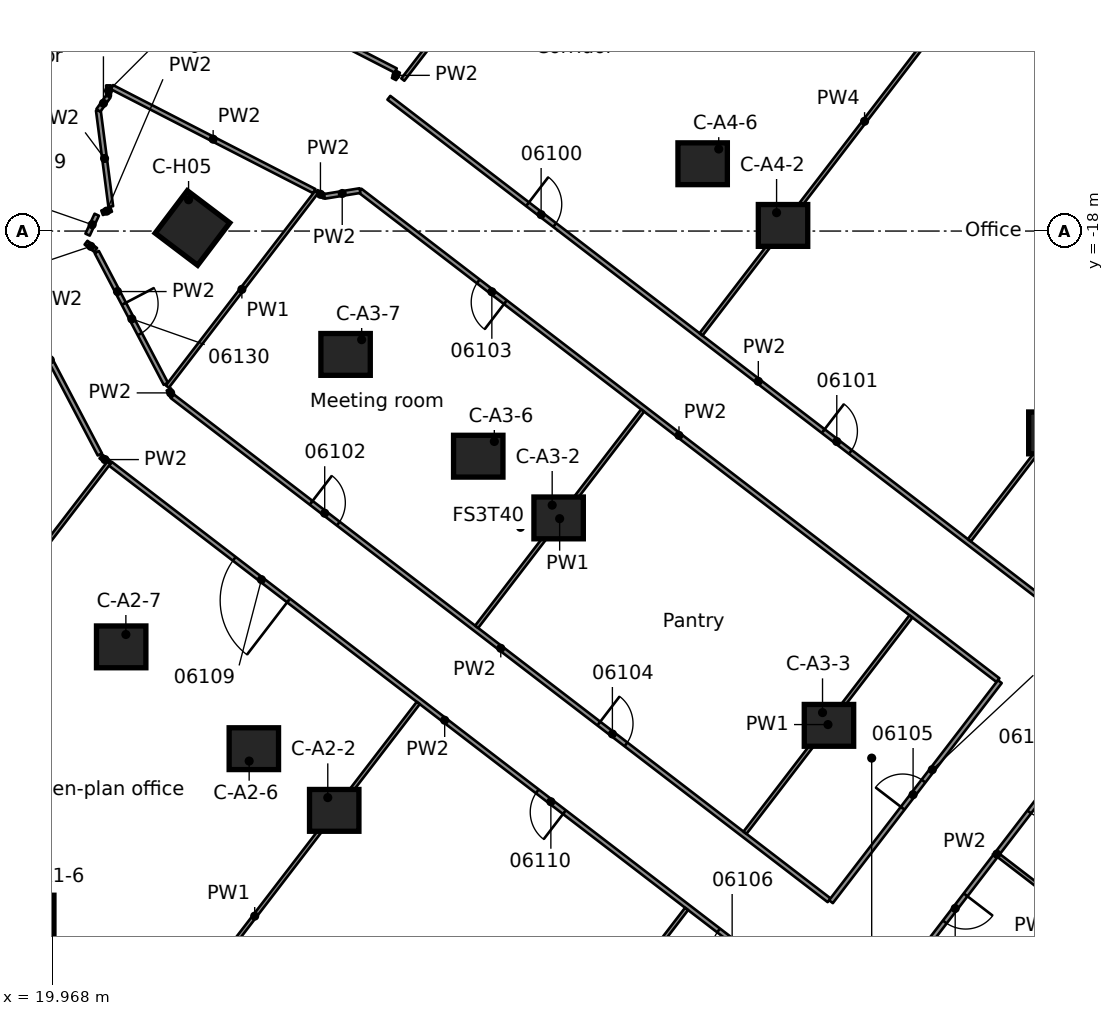
"""IFC4 building model, lengths in metres.
Left out: names, types, materials, properties, quantities, classifications, styles, units other than length and angle.
Written with IfcOpenShell. Run it as: python <this file> out.ifc"""

import sys

from ifc_helpers import new_model, si_unit, direction, frame, frame_2d, origin, origin_2d, place, context, subcontext, project, spatial, rectangle, extrude, element, fill, save


model = new_model("IFC4")
c1 = context("Model", 3, precision=1e-05, world=origin(), true_north=direction((0.0, 1.0)))
c2 = subcontext(c1, "Body", "Model", "MODEL_VIEW")
j1 = project(units=[si_unit("LENGTHUNIT", "METRE"), si_unit("PLANEANGLEUNIT", "RADIAN")], contexts=[c1])
p1 = place(None, origin())
s1 = spatial("IfcSite", under=j1, at=p1, CompositionType="ELEMENT")
p2 = place(p1, origin())
s2 = spatial("IfcBuilding", under=s1, at=p2, CompositionType="ELEMENT")
p3 = place(p2, frame((0.0, 0.0, 29.2)))
s3 = spatial("IfcBuildingStorey", under=s2, at=p3, CompositionType="ELEMENT", Elevation=29.2)
for number, where, z_axis, x_axis in (
    (1, (19.364, -36.026, 0.0), (0.0, 0.0, 1.0), (1.0, 0.0, 0.0)),
    (2, (27.389, -33.243, 0.0), (0.0, 0.0, 1.0), (1.0, 0.0, 0.0)),
    (3, (25.274, -31.62, 0.0), (0.0, 0.0, 1.0), (1.0, 0.0, 0.0)),
    (4, (21.783, -28.941, 0.0), (0.0, 0.0, 1.0), (1.0, 0.0, 0.0)),
    (5, (33.294, -25.548, 0.0), (0.0, 0.0, 1.0), (1.0, 0.0, 0.0)),
    (6, (40.408, -31.006, 0.0), (0.0, 0.0, 1.0), (1.0, 0.0, 0.0)),
    (7, (31.179, -23.924, 0.0), (0.0, 0.0, 1.0), (1.0, 0.0, 0.0)),
    (8, (27.688, -21.246, 0.0), (0.0, 0.0, 1.0), (1.0, 0.0, 0.0)),
    (9, (39.199, -17.852, 0.0), (0.0, 0.0, 1.0), (1.0, 0.0, 0.0)),
    (10, (46.313, -23.311, 0.0), (0.0, 0.0, 1.0), (1.0, 0.0, 0.0)),
    (11, (37.084, -16.229, 0.0), (0.0, 0.0, 1.0), (1.0, 0.0, 0.0)),
):
    element("IfcColumn", number, at=place(p3, frame(where, z_axis=z_axis, x_axis=x_axis)), inside=s3, PredefinedType="COLUMN", context=c2, shape_type="SweptSolid", body=[
        extrude(rectangle(XDim=1.3, YDim=1.1, at=origin_2d()), origin(), (0.0, 0.0, 1.0), 4.1),
    ])
p4 = place(p3, frame((23.659, -17.919, 0.0), z_axis=(0.0, 0.0, 1.0), x_axis=(0.797162615875, -0.603764659327, 0.0)))
e12 = element("IfcColumn", 12, at=p4, inside=s3, PredefinedType="COLUMN", context=c2, shape_type="SweptSolid", body=[
    extrude(rectangle(XDim=1.4, YDim=1.4, at=origin_2d()), origin(), (0.0, 0.0, 1.0), 4.1),
])
p5 = place(p3, frame((21.182, -14.826, 0.0), z_axis=(0.0, 0.0, 1.0), x_axis=(0.128335992274, -0.991730746265, 0.0)))
e13 = element("IfcWall", 13, at=p5, inside=s3, PredefinedType="PARTITIONING", context=c2, shape_type="SweptSolid", body=[
    extrude(rectangle(XDim=2.549, YDim=0.125, at=frame_2d((1.274, 0.0))), origin(), (0.0, 0.0, 1.0), 3.66),
])
p6 = place(p3, frame((23.036, -22.167, 0.0), z_axis=(0.0, 0.0, 1.0), x_axis=(0.465065214543, -0.885276423623, 0.0)))
e14 = element("IfcWall", 14, at=p6, inside=s3, PredefinedType="PARTITIONING", context=c2, shape_type="SweptSolid", body=[
    extrude(rectangle(XDim=0.207, YDim=0.125, at=frame_2d((0.104, 0.0))), origin(), (0.0, 0.0, 1.0), 3.66),
])
p7 = place(p3, frame((18.615, -18.909, 0.0), z_axis=(0.0, 0.0, 1.0), x_axis=(0.464655649815, -0.885491460769, 0.0)))
e15 = element("IfcWall", 15, at=p7, inside=s3, PredefinedType="PARTITIONING", context=c2, shape_type="SweptSolid", body=[
    extrude(rectangle(XDim=5.61, YDim=0.125, at=frame_2d((2.805, 0.0))), origin(), (0.0, 0.0, 1.0), 3.66),
])
p8 = place(p3, frame((21.14, -18.552, 0.0), z_axis=(0.0, 0.0, 1.0), x_axis=(0.464519693812, -0.885562789451, 0.0)))
e16 = element("IfcWall", 16, at=p8, inside=s3, PredefinedType="PARTITIONING", context=c2, shape_type="SweptSolid", body=[
    extrude(rectangle(XDim=3.914, YDim=0.125, at=frame_2d((1.957, 0.0))), origin(), (0.0, 0.0, 1.0), 3.66),
])
p9 = place(p8, frame((1.538, 0.0, 0.0)))
e17 = element("IfcOpeningElement", 17, at=p9, cuts=e16, PredefinedType="OPENING", context=c2, shape_type="SweptSolid", body=[
    extrude(rectangle(XDim=0.9, YDim=2.1, at=frame_2d((0.45, 1.05))), frame((0.0, 0.073, 0.0), z_axis=(0.0, -1.0, 0.0), x_axis=(1.0, 0.0, 0.0)), (0.0, 0.0, 1.0), 0.145),
])
p10 = place(p3, frame((39.09, -37.62, 0.0), z_axis=(0.0, 0.0, 1.0), x_axis=(-0.793364364442, 0.608747061786, 0.0)))
e18 = element("IfcWall", 18, at=p10, inside=s3, PredefinedType="PARTITIONING", context=c2, shape_type="SweptSolid", body=[
    extrude(rectangle(XDim=22.17, YDim=0.125, at=frame_2d((11.085, 0.0))), origin(), (0.0, 0.0, 1.0), 3.66),
])
p11 = place(p10, frame((1.1, 0.0, 0.0)))
e19 = element("IfcOpeningElement", 19, at=p11, cuts=e18, PredefinedType="OPENING", context=c2, shape_type="SweptSolid", body=[
    extrude(rectangle(XDim=0.9, YDim=2.1, at=frame_2d((0.45, 1.05))), frame((0.0, 0.073, 0.0), z_axis=(0.0, -1.0, 0.0), x_axis=(1.0, 0.0, 0.0)), (0.0, 0.0, 1.0), 0.145),
])
p12 = place(p10, frame((16.263, 0.0, 0.0)))
e20 = element("IfcOpeningElement", 20, at=p12, cuts=e18, PredefinedType="OPENING", context=c2, shape_type="SweptSolid", body=[
    extrude(rectangle(XDim=1.8, YDim=2.1, at=frame_2d((0.9, 1.05))), frame((0.0, 0.073, 0.0), z_axis=(0.0, -1.0, 0.0), x_axis=(1.0, 0.0, 0.0)), (0.0, 0.0, 1.0), 0.145),
])
p13 = place(p10, frame((7.113, 0.0, 0.0)))
e21 = element("IfcOpeningElement", 21, at=p13, cuts=e18, PredefinedType="OPENING", context=c2, shape_type="SweptSolid", body=[
    extrude(rectangle(XDim=0.9, YDim=2.1, at=frame_2d((0.45, 1.05))), frame((0.0, 0.073, 0.0), z_axis=(0.0, -1.0, 0.0), x_axis=(1.0, 0.0, 0.0)), (0.0, 0.0, 1.0), 0.145),
])
p14 = place(p3, frame((23.132, -22.35, 0.0), z_axis=(0.0, 0.0, 1.0), x_axis=(0.79336850047, -0.60874167137, 0.0)))
e22 = element("IfcWall", 22, at=p14, inside=s3, PredefinedType="PARTITIONING", context=c2, shape_type="SweptSolid", body=[
    extrude(rectangle(XDim=21.779, YDim=0.125, at=frame_2d((10.89, 0.0))), origin(), (0.0, 0.0, 1.0), 3.66),
])
p15 = place(p14, frame((4.6, 0.0, 0.0)))
e23 = element("IfcOpeningElement", 23, at=p15, cuts=e22, PredefinedType="OPENING", context=c2, shape_type="SweptSolid", body=[
    extrude(rectangle(XDim=0.9, YDim=2.1, at=frame_2d((0.45, 1.05))), frame((0.0, 0.073, 0.0), z_axis=(0.0, -1.0, 0.0), x_axis=(1.0, 0.0, 0.0)), (0.0, 0.0, 1.0), 0.145),
])
p16 = place(p14, frame((14.142, 0.0, 0.0)))
e24 = element("IfcOpeningElement", 24, at=p16, cuts=e22, PredefinedType="OPENING", context=c2, shape_type="SweptSolid", body=[
    extrude(rectangle(XDim=0.9, YDim=2.1, at=frame_2d((0.45, 1.05))), frame((0.0, 0.073, 0.0), z_axis=(0.0, -1.0, 0.0), x_axis=(1.0, 0.0, 0.0)), (0.0, 0.0, 1.0), 0.145),
])
p17 = place(p3, frame((44.875, -34.433, 0.0), z_axis=(0.0, 0.0, 1.0), x_axis=(0.793295570217, -0.60883670904, 0.0)))
e25 = element("IfcWall", 25, at=p17, inside=s3, PredefinedType="PARTITIONING", context=c2, shape_type="SweptSolid", body=[
    extrude(rectangle(XDim=4.186, YDim=0.1, at=frame_2d((2.093, 0.0))), origin(), (0.0, 0.0, 1.0), 3.66),
])
p18 = place(p3, frame((44.855, -29.817, 0.0), z_axis=(0.0, 0.0, 1.0), x_axis=(-0.793378264443, 0.608728945844, 0.0)))
e26 = element("IfcWall", 26, at=p18, inside=s3, PredefinedType="PARTITIONING", context=c2, shape_type="SweptSolid", body=[
    extrude(rectangle(XDim=21.16, YDim=0.125, at=frame_2d((10.58, 0.0))), origin(), (0.0, 0.0, 1.0), 3.66),
])
p19 = place(p18, frame((16.337, 0.0, 0.0)))
e27 = element("IfcOpeningElement", 27, at=p19, cuts=e26, PredefinedType="OPENING", context=c2, shape_type="SweptSolid", body=[
    extrude(rectangle(XDim=0.9, YDim=2.1, at=frame_2d((0.45, 1.05))), frame((0.0, 0.073, 0.0), z_axis=(0.0, -1.0, 0.0), x_axis=(1.0, 0.0, 0.0)), (0.0, 0.0, 1.0), 0.145),
])
p20 = place(p3, frame((28.827, -14.493, 0.0), z_axis=(0.0, 0.0, 1.0), x_axis=(0.793315591759, -0.608810620695, 0.0)))
e28 = element("IfcWall", 28, at=p20, inside=s3, PredefinedType="PARTITIONING", context=c2, shape_type="SweptSolid", body=[
    extrude(rectangle(XDim=24.509, YDim=0.125, at=frame_2d((12.254, 0.0))), origin(), (0.0, 0.0, 1.0), 3.66),
])
p21 = place(p20, frame((4.6, 0.0, 0.0)))
e29 = element("IfcOpeningElement", 29, at=p21, cuts=e28, PredefinedType="OPENING", context=c2, shape_type="SweptSolid", body=[
    extrude(rectangle(XDim=0.9, YDim=2.1, at=frame_2d((0.45, 1.05))), frame((0.0, 0.073, 0.0), z_axis=(0.0, -1.0, 0.0), x_axis=(1.0, 0.0, 0.0)), (0.0, 0.0, 1.0), 0.145),
])
p22 = place(p20, frame((14.407, 0.0, 0.0)))
e30 = element("IfcOpeningElement", 30, at=p22, cuts=e28, PredefinedType="OPENING", context=c2, shape_type="SweptSolid", body=[
    extrude(rectangle(XDim=0.9, YDim=2.1, at=frame_2d((0.45, 1.05))), frame((0.0, 0.073, 0.0), z_axis=(0.0, -1.0, 0.0), x_axis=(1.0, 0.0, 0.0)), (0.0, 0.0, 1.0), 0.145),
])
p23 = place(p3, frame((21.251, -23.933, 0.0), z_axis=(0.0, 0.0, 1.0), x_axis=(0.795537882178, -0.605903852124, 0.0)))
e31 = element("IfcWall", 31, at=p23, inside=s3, PredefinedType="PARTITIONING", context=c2, shape_type="SweptSolid", body=[
    extrude(rectangle(XDim=0.264, YDim=0.125, at=frame_2d((0.132, 0.0))), origin(), (0.0, 0.0, 1.0), 3.66),
])
p24 = place(p3, frame((20.858, -18.306, 0.0), z_axis=(0.0, 0.0, 1.0), x_axis=(0.798056474533, -0.602582661098, 0.0)))
e32 = element("IfcWall", 32, at=p24, inside=s3, PredefinedType="PARTITIONING", context=c2, shape_type="SweptSolid", body=[
    extrude(rectangle(XDim=0.317, YDim=0.125, at=frame_2d((0.159, 0.0))), origin(), (0.0, 0.0, 1.0), 3.66),
])
p25 = place(p3, frame((26.921, -16.978, 0.0), z_axis=(0.0, 0.0, 1.0), x_axis=(0.888809707019, -0.458276450093, 0.0)))
e33 = element("IfcWall", 33, at=p25, inside=s3, PredefinedType="PARTITIONING", context=c2, shape_type="SweptSolid", body=[
    extrude(rectangle(XDim=0.238, YDim=0.125, at=frame_2d((0.119, 0.0))), origin(), (0.0, 0.0, 1.0), 3.66),
])
p26 = place(p3, frame((21.541, -14.214, 0.0), z_axis=(0.0, 0.0, 1.0), x_axis=(0.889437525622, -0.457056766732, 0.0)))
e34 = element("IfcWall", 34, at=p26, inside=s3, PredefinedType="PARTITIONING", context=c2, shape_type="SweptSolid", body=[
    extrude(rectangle(XDim=5.986, YDim=0.125, at=frame_2d((2.993, 0.0))), origin(), (0.0, 0.0, 1.0), 3.66),
])
p27 = place(p3, frame((21.541, -9.94, 0.0), z_axis=(0.0, 0.0, 1.0), x_axis=(0.889469569246, -0.456994404107, 0.0)))
e35 = element("IfcWall", 35, at=p27, inside=s3, PredefinedType="PARTITIONING", context=c2, shape_type="SweptSolid", body=[
    extrude(rectangle(XDim=8.394, YDim=0.125, at=frame_2d((4.197, 0.0))), origin(), (0.0, 0.0, 1.0), 3.66),
])
p28 = place(p3, frame((21.182, -14.826, 0.0), z_axis=(0.0, 0.0, 1.0), x_axis=(0.581538757464, 0.813518698966, 0.0)))
e36 = element("IfcWall", 36, at=p28, inside=s3, PredefinedType="PARTITIONING", context=c2, shape_type="SweptSolid", body=[
    extrude(rectangle(XDim=0.461, YDim=0.125, at=frame_2d((0.23, 0.0))), origin(), (0.0, 0.0, 1.0), 3.66),
])
p29 = place(p3, frame((21.281, -17.519, 0.0), z_axis=(0.0, 0.0, 1.0), x_axis=(0.939031864477, 0.343830128839, 0.0)))
e37 = element("IfcWall", 37, at=p29, inside=s3, PredefinedType="PARTITIONING", context=c2, shape_type="SweptSolid", body=[
    extrude(rectangle(XDim=0.253, YDim=0.125, at=frame_2d((0.127, 0.0))), origin(), (0.0, 0.0, 1.0), 3.66),
])
p30 = place(p3, frame((48.508, -29.595, 0.0), z_axis=(0.0, 0.0, 1.0), x_axis=(-0.608738166201, -0.793371189929, 0.0)))
e38 = element("IfcWall", 38, at=p30, inside=s3, PredefinedType="PARTITIONING", context=c2, shape_type="SweptSolid", body=[
    extrude(rectangle(XDim=12.1, YDim=0.125, at=frame_2d((6.05, 0.0))), origin(), (0.0, 0.0, 1.0), 3.66),
])
p31 = place(p30, frame((7.4, 0.0, 0.0)))
e39 = element("IfcOpeningElement", 39, at=p31, cuts=e38, PredefinedType="OPENING", context=c2, shape_type="SweptSolid", body=[
    extrude(rectangle(XDim=0.9, YDim=2.1, at=frame_2d((0.45, 1.05))), frame((0.0, 0.073, 0.0), z_axis=(0.0, -1.0, 0.0), x_axis=(1.0, 0.0, 0.0)), (0.0, 0.0, 1.0), 0.145),
])
p32 = place(p30, frame((3.75, 0.0, 0.0)))
e40 = element("IfcOpeningElement", 40, at=p32, cuts=e38, PredefinedType="OPENING", context=c2, shape_type="SweptSolid", body=[
    extrude(rectangle(XDim=0.9, YDim=2.1, at=frame_2d((0.45, 1.05))), frame((0.0, 0.073, 0.0), z_axis=(0.0, -1.0, 0.0), x_axis=(1.0, 0.0, 0.0)), (0.0, 0.0, 1.0), 0.145),
])
p33 = place(p3, frame((40.46, -35.646, 0.0), z_axis=(0.0, 0.0, 1.0), x_axis=(0.608868228501, 0.793271378736, 0.0)))
e41 = element("IfcWall", 41, at=p33, inside=s3, PredefinedType="PARTITIONING", context=c2, shape_type="SweptSolid", body=[
    extrude(rectangle(XDim=7.299, YDim=0.125, at=frame_2d((3.649, 0.0))), origin(), (0.0, 0.0, 1.0), 3.66),
])
p34 = place(p33, frame((3.1, 0.0, 0.0)))
e42 = element("IfcOpeningElement", 42, at=p34, cuts=e41, PredefinedType="OPENING", context=c2, shape_type="SweptSolid", body=[
    extrude(rectangle(XDim=0.9, YDim=2.1, at=frame_2d((0.45, 1.05))), frame((0.0, 0.073, 0.0), z_axis=(0.0, -1.0, 0.0), x_axis=(1.0, 0.0, 0.0)), (0.0, 0.0, 1.0), 0.145),
])
p35 = place(p3, frame((28.054, -47.051, 0.0), z_axis=(0.0, 0.0, 1.0), x_axis=(0.608819037892, 0.793309132117, 0.0)))
e43 = element("IfcWall", 43, at=p35, inside=s3, PredefinedType="PARTITIONING", context=c2, shape_type="SweptSolid", body=[
    extrude(rectangle(XDim=14.137, YDim=0.1, at=frame_2d((7.069, 0.0))), origin(), (0.0, 0.0, 1.0), 3.66),
])
p36 = place(p3, frame((38.198, -33.831, 0.0), z_axis=(0.0, 0.0, 1.0), x_axis=(0.60875801413, 0.793355960608, 0.0)))
e44 = element("IfcWall", 44, at=p36, inside=s3, PredefinedType="PARTITIONING", context=c2, shape_type="SweptSolid", body=[
    extrude(rectangle(XDim=7.174, YDim=0.1, at=frame_2d((3.587, 0.0))), origin(), (0.0, 0.0, 1.0), 3.66),
])
p37 = place(p3, frame((44.103, -26.136, 0.0), z_axis=(0.0, 0.0, 1.0), x_axis=(0.608732079898, 0.793375859793, 0.0)))
e45 = element("IfcWall", 45, at=p37, inside=s3, PredefinedType="PARTITIONING", context=c2, shape_type="SweptSolid", body=[
    extrude(rectangle(XDim=14.136, YDim=0.1, at=frame_2d((7.068, 0.0))), origin(), (0.0, 0.0, 1.0), 3.66),
])
p38 = place(p3, frame((20.993, -41.633, 0.0), z_axis=(0.0, 0.0, 1.0), x_axis=(0.608829906099, 0.793300791277, 0.0)))
e46 = element("IfcWall", 46, at=p38, inside=s3, PredefinedType="PARTITIONING", context=c2, shape_type="SweptSolid", body=[
    extrude(rectangle(XDim=14.137, YDim=0.1, at=frame_2d((7.069, 0.0))), origin(), (0.0, 0.0, 1.0), 3.66),
])
p39 = place(p3, frame((31.137, -28.413, 0.0), z_axis=(0.0, 0.0, 1.0), x_axis=(0.608843688194, 0.793290213822, 0.0)))
e47 = element("IfcWall", 47, at=p39, inside=s3, PredefinedType="PARTITIONING", context=c2, shape_type="SweptSolid", body=[
    extrude(rectangle(XDim=7.174, YDim=0.1, at=frame_2d((3.587, 0.0))), origin(), (0.0, 0.0, 1.0), 3.66),
])
p40 = place(p3, frame((37.042, -20.718, 0.0), z_axis=(0.0, 0.0, 1.0), x_axis=(0.608775561638, 0.793342495743, 0.0)))
e48 = element("IfcWall", 48, at=p40, inside=s3, PredefinedType="PARTITIONING", context=c2, shape_type="SweptSolid", body=[
    extrude(rectangle(XDim=14.136, YDim=0.1, at=frame_2d((7.068, 0.0))), origin(), (0.0, 0.0, 1.0), 3.025),
])
p41 = place(p3, frame((12.817, -35.359, 0.0), z_axis=(0.0, 0.0, 1.0), x_axis=(0.608769712687, 0.793346983932, 0.0)))
e49 = element("IfcWall", 49, at=p41, inside=s3, PredefinedType="PARTITIONING", context=c2, shape_type="SweptSolid", body=[
    extrude(rectangle(XDim=14.199, YDim=0.1, at=frame_2d((7.1, 0.0))), origin(), (0.0, 0.0, 1.0), 3.66),
])
p42 = place(p3, frame((22.997, -22.092, 0.0), z_axis=(0.0, 0.0, 1.0), x_axis=(0.608732859409, 0.793375261699, 0.0)))
e50 = element("IfcWall", 50, at=p42, inside=s3, PredefinedType="PARTITIONING", context=c2, shape_type="SweptSolid", body=[
    extrude(rectangle(XDim=6.446, YDim=0.1, at=frame_2d((3.223, 0.0))), origin(), (0.0, 0.0, 1.0), 3.66),
])
p43 = place(p3, frame((29.194, -14.015, 0.0), z_axis=(0.0, 0.0, 1.0), x_axis=(0.608832188233, 0.793299039815, 0.0)))
e51 = element("IfcWall", 51, at=p43, inside=s3, PredefinedType="PARTITIONING", context=c2, shape_type="SweptSolid", body=[
    extrude(rectangle(XDim=13.596, YDim=0.1, at=frame_2d((6.798, 0.0))), origin(), (0.0, 0.0, 1.0), 3.025),
])
p44 = place(p3, frame((28.962, -14.0, 0.0), z_axis=(0.0, 0.0, 1.0), x_axis=(0.458358127557, 0.8887675888, 0.0)))
e52 = element("IfcWall", 52, at=p44, inside=s3, PredefinedType="PARTITIONING", context=c2, shape_type="SweptSolid", body=[
    extrude(rectangle(XDim=0.218, YDim=0.125, at=frame_2d((0.109, 0.0))), origin(), (0.0, 0.0, 1.0), 3.66),
])
p45 = place(p3, frame((27.132, -17.087, 0.0), z_axis=(0.0, 0.0, 1.0), x_axis=(0.987224118301, 0.159337817997, 0.0)))
e53 = element("IfcWall", 53, at=p45, inside=s3, PredefinedType="PARTITIONING", context=c2, shape_type="SweptSolid", body=[
    extrude(rectangle(XDim=0.947, YDim=0.125, at=frame_2d((0.474, 0.0))), origin(), (0.0, 0.0, 1.0), 3.66),
])
p46 = place(p3, frame((20.899, -18.094, 0.0), z_axis=(0.0, 0.0, 1.0), x_axis=(0.417849700766, 0.908516168029, 0.0)))
e54 = element("IfcWall", 54, at=p46, inside=s3, PredefinedType="PARTITIONING", context=c2, shape_type="SweptSolid", body=[
    extrude(rectangle(XDim=0.577, YDim=0.125, at=frame_2d((0.288, 0.0))), origin(), (0.0, 0.0, 1.0), 3.66),
])
p47 = place(p3, frame((21.45, -14.451, 0.0), z_axis=(0.0, 0.0, 1.0), x_axis=(0.0, 1.0, 0.0)))
e55 = element("IfcWall", 55, at=p47, inside=s3, PredefinedType="PARTITIONING", context=c2, shape_type="SweptSolid", body=[
    extrude(rectangle(XDim=0.284, YDim=0.125, at=frame_2d((0.142, 0.0))), origin(), (0.0, 0.0, 1.0), 3.66),
])
p48 = place(p21, origin())
e56 = element("IfcDoor", 56, at=p48, inside=s3, OperationType="SINGLE_SWING_LEFT", PredefinedType="DOOR", context=c2, shape_type="SweptSolid", body=[
    extrude(rectangle(XDim=0.9, YDim=2.1, at=frame_2d((0.45, 1.05))), frame((0.0, 0.025, 0.0), z_axis=(0.0, -1.0, 0.0), x_axis=(1.0, 0.0, 0.0)), (0.0, 0.0, 1.0), 0.05),
])
fill(e29, e56)
p49 = place(p22, origin())
e57 = element("IfcDoor", 57, at=p49, inside=s3, OperationType="SINGLE_SWING_RIGHT", PredefinedType="DOOR", context=c2, shape_type="SweptSolid", body=[
    extrude(rectangle(XDim=0.9, YDim=2.1, at=frame_2d((0.45, 1.05))), frame((0.0, 0.025, 0.0), z_axis=(0.0, -1.0, 0.0), x_axis=(1.0, 0.0, 0.0)), (0.0, 0.0, 1.0), 0.05),
])
fill(e30, e57)
p50 = place(p15, origin())
e58 = element("IfcDoor", 58, at=p50, inside=s3, OperationType="SINGLE_SWING_LEFT", PredefinedType="DOOR", context=c2, shape_type="SweptSolid", body=[
    extrude(rectangle(XDim=0.9, YDim=2.1, at=frame_2d((0.45, 1.05))), frame((0.0, 0.025, 0.0), z_axis=(0.0, -1.0, 0.0), x_axis=(1.0, 0.0, 0.0)), (0.0, 0.0, 1.0), 0.05),
])
fill(e23, e58)
p51 = place(p19, origin())
e59 = element("IfcDoor", 59, at=p51, inside=s3, OperationType="SINGLE_SWING_RIGHT", PredefinedType="DOOR", context=c2, shape_type="SweptSolid", body=[
    extrude(rectangle(XDim=0.9, YDim=2.1, at=frame_2d((0.45, 1.05))), frame((0.0, 0.025, 0.0), z_axis=(0.0, -1.0, 0.0), x_axis=(1.0, 0.0, 0.0)), (0.0, 0.0, 1.0), 0.05),
])
fill(e27, e59)
p52 = place(p16, origin())
e60 = element("IfcDoor", 60, at=p52, inside=s3, OperationType="SINGLE_SWING_RIGHT", PredefinedType="DOOR", context=c2, shape_type="SweptSolid", body=[
    extrude(rectangle(XDim=0.9, YDim=2.1, at=frame_2d((0.45, 1.05))), frame((0.0, 0.025, 0.0), z_axis=(0.0, -1.0, 0.0), x_axis=(1.0, 0.0, 0.0)), (0.0, 0.0, 1.0), 0.05),
])
fill(e24, e60)
p53 = place(p34, origin())
e61 = element("IfcDoor", 61, at=p53, inside=s3, OperationType="SINGLE_SWING_LEFT", PredefinedType="DOOR", context=c2, shape_type="SweptSolid", body=[
    extrude(rectangle(XDim=0.9, YDim=2.1, at=frame_2d((0.45, 1.05))), frame((0.0, 0.025, 0.0), z_axis=(0.0, -1.0, 0.0), x_axis=(1.0, 0.0, 0.0)), (0.0, 0.0, 1.0), 0.05),
])
fill(e42, e61)
p54 = place(p11, origin())
e62 = element("IfcDoor", 62, at=p54, inside=s3, OperationType="SINGLE_SWING_LEFT", PredefinedType="DOOR", context=c2, shape_type="SweptSolid", body=[
    extrude(rectangle(XDim=0.9, YDim=2.1, at=frame_2d((0.45, 1.05))), frame((0.0, 0.025, 0.0), z_axis=(0.0, -1.0, 0.0), x_axis=(1.0, 0.0, 0.0)), (0.0, 0.0, 1.0), 0.05),
])
fill(e19, e62)
p55 = place(p31, origin())
e63 = element("IfcDoor", 63, at=p55, inside=s3, OperationType="SINGLE_SWING_RIGHT", PredefinedType="DOOR", context=c2, shape_type="SweptSolid", body=[
    extrude(rectangle(XDim=0.9, YDim=2.1, at=frame_2d((0.45, 1.05))), frame((0.0, 0.025, 0.0), z_axis=(0.0, -1.0, 0.0), x_axis=(1.0, 0.0, 0.0)), (0.0, 0.0, 1.0), 0.05),
])
fill(e39, e63)
p56 = place(p32, origin())
e64 = element("IfcDoor", 64, at=p56, inside=s3, OperationType="SINGLE_SWING_LEFT", PredefinedType="DOOR", context=c2, shape_type="SweptSolid", body=[
    extrude(rectangle(XDim=0.9, YDim=2.1, at=frame_2d((0.45, 1.05))), frame((0.0, 0.025, 0.0), z_axis=(0.0, -1.0, 0.0), x_axis=(1.0, 0.0, 0.0)), (0.0, 0.0, 1.0), 0.05),
])
fill(e40, e64)
p57 = place(p12, origin())
e65 = element("IfcDoor", 65, at=p57, inside=s3, OperationType="DOUBLE_DOOR_SINGLE_SWING", PredefinedType="DOOR", context=c2, shape_type="SweptSolid", body=[
    extrude(rectangle(XDim=1.8, YDim=2.1, at=frame_2d((0.9, 1.05))), frame((0.0, 0.025, 0.0), z_axis=(0.0, -1.0, 0.0), x_axis=(1.0, 0.0, 0.0)), (0.0, 0.0, 1.0), 0.05),
])
fill(e20, e65)
p58 = place(p13, origin())
e66 = element("IfcDoor", 66, at=p58, inside=s3, OperationType="SINGLE_SWING_LEFT", PredefinedType="DOOR", context=c2, shape_type="SweptSolid", body=[
    extrude(rectangle(XDim=0.9, YDim=2.1, at=frame_2d((0.45, 1.05))), frame((0.0, 0.025, 0.0), z_axis=(0.0, -1.0, 0.0), x_axis=(1.0, 0.0, 0.0)), (0.0, 0.0, 1.0), 0.05),
])
fill(e21, e66)
p59 = place(p9, origin())
e67 = element("IfcDoor", 67, at=p59, inside=s3, OperationType="SINGLE_SWING_RIGHT", PredefinedType="DOOR", context=c2, shape_type="SweptSolid", body=[
    extrude(rectangle(XDim=0.9, YDim=2.1, at=frame_2d((0.45, 1.05))), frame((0.0, 0.025, 0.0), z_axis=(0.0, -1.0, 0.0), x_axis=(1.0, 0.0, 0.0)), (0.0, 0.0, 1.0), 0.05),
])
fill(e17, e67)
save(model, sys.argv[1])
